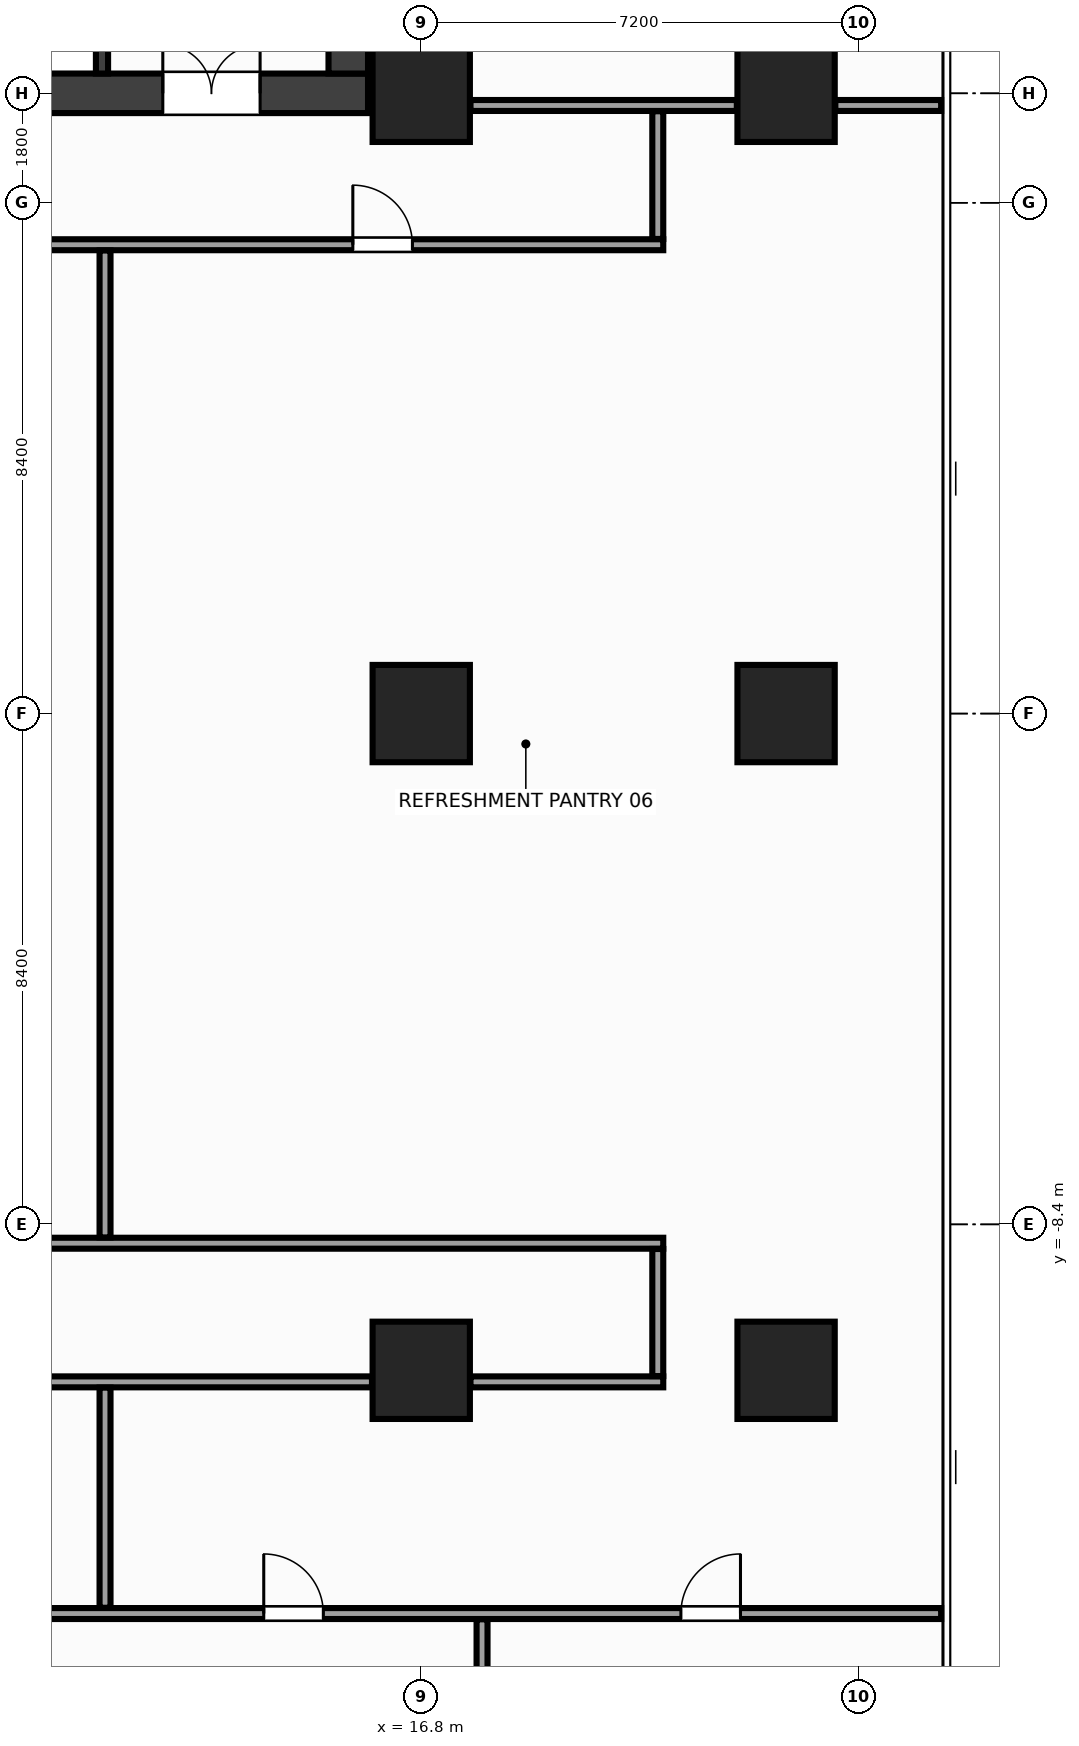
"""IFC4 building model, lengths in metres.
Left out: names, types, materials, properties, quantities, classifications, styles, units other than length and angle.
Written with IfcOpenShell. Run it as: python <this file> out.ifc"""

import sys

from ifc_helpers import new_model, si_unit, direction, frame, frame_2d, origin, origin_2d, place, context, subcontext, project, spatial, rectangle, extrude, source, transform, mapped, element, fill, save


model = new_model("IFC4")
c1 = context("Model", 3, precision=1e-05, world=origin(), true_north=direction((0.0, 1.0)))
c2 = subcontext(c1, "Body", "Model", "MODEL_VIEW")
j1 = project(units=[si_unit("LENGTHUNIT", "METRE"), si_unit("PLANEANGLEUNIT", "RADIAN")], contexts=[c1])
p1 = place(None, origin())
s1 = spatial("IfcSite", under=j1, at=p1, CompositionType="ELEMENT")
p2 = place(p1, origin())
s2 = spatial("IfcBuilding", under=s1, at=p2, CompositionType="ELEMENT")
p3 = place(p2, frame((0.0, 0.0, 120.8)))
s3 = spatial("IfcBuildingStorey", under=s2, at=p3, CompositionType="ELEMENT", Elevation=120.8)
m1 = source(origin(), c2, "Body", "SweptSolid", [
    extrude(rectangle(XDim=31.85, YDim=0.65, at=frame_2d((15.925, 0.0))), origin(), (0.0, 0.0, 1.0), 3.6),
])
p4 = place(p3, frame((-15.925, 10.2, 0.0), z_axis=(0.0, 0.0, 1.0), x_axis=(1.0, 0.0, 0.0)))
e1 = element("IfcWall", 1, at=p4, inside=s3, PredefinedType="SHEAR", context=c2, shape_type="MappedRepresentation", body=[
    mapped(m1, transform((0.0, 0.0, 0.0), x_axis=(1.0, 0.0, 0.0), y_axis=(0.0, 1.0, 0.0), z_axis=(0.0, 0.0, 1.0), scale=1.0)),
])
p5 = place(p4, frame((1.775, 0.0, 0.0)))
e2 = element("IfcOpeningElement", 2, at=p5, cuts=e1, PredefinedType="OPENING", context=c2, shape_type="SweptSolid", body=[
    extrude(rectangle(XDim=1.6, YDim=2.15, at=frame_2d((0.8, 1.075))), frame((0.0, 0.337, 0.0), z_axis=(0.0, -1.0, 0.0), x_axis=(1.0, 0.0, 0.0)), (0.0, 0.0, 1.0), 0.674),
])
p6 = place(p4, frame((28.475, 0.0, 0.0)))
e3 = element("IfcOpeningElement", 3, at=p6, cuts=e1, PredefinedType="OPENING", context=c2, shape_type="SweptSolid", body=[
    extrude(rectangle(XDim=1.6, YDim=2.15, at=frame_2d((0.8, 1.075))), frame((0.0, 0.337, 0.0), z_axis=(0.0, -1.0, 0.0), x_axis=(1.0, 0.0, 0.0)), (0.0, 0.0, 1.0), 0.674),
])
p7 = place(p4, frame((15.175, 0.0, 0.0)))
e4 = element("IfcOpeningElement", 4, at=p7, cuts=e1, PredefinedType="OPENING", context=c2, shape_type="SweptSolid", body=[
    extrude(rectangle(XDim=1.5, YDim=2.2, at=frame_2d((0.75, 1.1))), frame((0.0, 0.337, 0.0), z_axis=(0.0, -1.0, 0.0), x_axis=(1.0, 0.0, 0.0)), (0.0, 0.0, 1.0), 0.674),
])
m2 = source(origin(), c2, "Body", "SweptSolid", [
    extrude(rectangle(XDim=12.95, YDim=0.65, at=frame_2d((6.475, 0.0))), origin(), (0.0, 0.0, 1.0), 3.6),
])
p8 = place(p3, frame((15.6, 10.525, 0.0), z_axis=(0.0, 0.0, 1.0), x_axis=(0.0, 1.0, 0.0)))
e5 = element("IfcWall", 5, at=p8, inside=s3, PredefinedType="SHEAR", context=c2, shape_type="MappedRepresentation", body=[
    mapped(m2, transform((0.0, 0.0, 0.0), x_axis=(1.0, 0.0, 0.0), y_axis=(0.0, 1.0, 0.0), z_axis=(0.0, 0.0, 1.0), scale=1.0)),
])
m3 = source(origin(), c2, "Body", "SweptSolid", [
    extrude(rectangle(XDim=3.125, YDim=0.2, at=frame_2d((1.562, 0.0))), origin(), (0.0, 0.0, 1.0), 3.6),
])
p9 = place(p3, frame((11.55, 10.525, 0.0), z_axis=(0.0, 0.0, 1.0), x_axis=(0.0, 1.0, 0.0)))
e6 = element("IfcWall", 6, at=p9, inside=s3, PredefinedType="SHEAR", context=c2, shape_type="MappedRepresentation", body=[
    mapped(m3, transform((0.0, 0.0, 0.0), x_axis=(1.0, 0.0, 0.0), y_axis=(0.0, 1.0, 0.0), z_axis=(0.0, 0.0, 1.0), scale=1.0)),
])
p10 = place(p9, frame((0.9, 0.0, 0.0)))
e7 = element("IfcOpeningElement", 7, at=p10, cuts=e6, PredefinedType="OPENING", context=c2, shape_type="SweptSolid", body=[
    extrude(rectangle(XDim=1.1, YDim=2.15, at=frame_2d((0.55, 1.075))), frame((0.0, 0.112, 0.0), z_axis=(0.0, -1.0, 0.0), x_axis=(1.0, 0.0, 0.0)), (0.0, 0.0, 1.0), 0.224),
])
m4 = source(origin(), c2, "Body", "SweptSolid", [
    extrude(rectangle(XDim=1.6, YDim=1.6, at=origin_2d()), origin(), (0.0, 0.0, 1.0), 3.6),
])
for number, where, z_axis, x_axis in (
    (8, (16.8, -10.8, 0.0), (0.0, 0.0, 1.0), (1.0, 0.0, 0.0)),
    (9, (16.8, 0.0, 0.0), (0.0, 0.0, 1.0), (1.0, 0.0, 0.0)),
    (10, (16.8, 10.2, 0.0), (0.0, 0.0, 1.0), (1.0, 0.0, 0.0)),
    (11, (22.8, -10.8, 0.0), (0.0, 0.0, 1.0), (1.0, 0.0, 0.0)),
    (12, (22.8, 0.0, 0.0), (0.0, 0.0, 1.0), (1.0, 0.0, 0.0)),
    (13, (22.8, 10.2, 0.0), (0.0, 0.0, 1.0), (1.0, 0.0, 0.0)),
):
    element("IfcColumn", number, at=place(p3, frame(where, z_axis=z_axis, x_axis=x_axis)), inside=s3, PredefinedType="COLUMN", context=c2, shape_type="MappedRepresentation", body=[
        mapped(m4, transform((0.0, 0.0, 0.0), x_axis=(1.0, 0.0, 0.0), y_axis=(0.0, 1.0, 0.0), z_axis=(0.0, 0.0, 1.0), scale=1.0)),
    ])
m5 = source(origin(), c2, "Body", "SweptSolid", [
    extrude(rectangle(XDim=4.38, YDim=0.18, at=frame_2d((2.19, 0.0))), origin(), (0.0, 0.0, 1.0), 2.685),
])
p11 = place(p3, frame((17.61, 10.0, 0.0), z_axis=(0.0, 0.0, 1.0), x_axis=(1.0, 0.0, 0.0)))
e14 = element("IfcWall", 14, at=p11, inside=s3, PredefinedType="PARTITIONING", context=c2, shape_type="MappedRepresentation", body=[
    mapped(m5, transform((0.0, 0.0, 0.0), x_axis=(1.0, 0.0, 0.0), y_axis=(0.0, 1.0, 0.0), z_axis=(0.0, 0.0, 1.0), scale=1.0)),
])
m6 = source(origin(), c2, "Body", "SweptSolid", [
    extrude(rectangle(XDim=1.74, YDim=0.18, at=frame_2d((0.87, 0.0))), origin(), (0.0, 0.0, 1.0), 3.3),
])
p12 = place(p3, frame((23.61, 10.0, 0.0), z_axis=(0.0, 0.0, 1.0), x_axis=(1.0, 0.0, 0.0)))
e15 = element("IfcWall", 15, at=p12, inside=s3, PredefinedType="PARTITIONING", context=c2, shape_type="MappedRepresentation", body=[
    mapped(m6, transform((0.0, 0.0, 0.0), x_axis=(1.0, 0.0, 0.0), y_axis=(0.0, 1.0, 0.0), z_axis=(0.0, 0.0, 1.0), scale=1.0)),
])
m7 = source(origin(), c2, "Body", "SweptSolid", [
    extrude(rectangle(XDim=22.3, YDim=0.18, at=frame_2d((11.15, 0.0))), origin(), (0.0, 0.0, 1.0), 2.685),
])
p13 = place(p3, frame((-1.52, 7.71, 0.0), z_axis=(0.0, 0.0, 1.0), x_axis=(1.0, 0.0, 0.0)))
e16 = element("IfcWall", 16, at=p13, inside=s3, PredefinedType="PARTITIONING", context=c2, shape_type="MappedRepresentation", body=[
    mapped(m7, transform((0.0, 0.0, 0.0), x_axis=(1.0, 0.0, 0.0), y_axis=(0.0, 1.0, 0.0), z_axis=(0.0, 0.0, 1.0), scale=1.0)),
])
p14 = place(p13, frame((0.685, 0.0, 0.0)))
e17 = element("IfcOpeningElement", 17, at=p14, cuts=e16, PredefinedType="OPENING", context=c2, shape_type="SweptSolid", body=[
    extrude(rectangle(XDim=0.98, YDim=2.15, at=frame_2d((0.49, 1.075))), frame((0.0, 0.102, 0.0), z_axis=(0.0, -1.0, 0.0), x_axis=(1.0, 0.0, 0.0)), (0.0, 0.0, 1.0), 0.204),
])
p15 = place(p13, frame((7.23, 0.0, 0.0)))
e18 = element("IfcOpeningElement", 18, at=p15, cuts=e16, PredefinedType="OPENING", context=c2, shape_type="SweptSolid", body=[
    extrude(rectangle(XDim=0.98, YDim=2.15, at=frame_2d((0.49, 1.075))), frame((0.0, 0.102, 0.0), z_axis=(0.0, -1.0, 0.0), x_axis=(1.0, 0.0, 0.0)), (0.0, 0.0, 1.0), 0.204),
])
p16 = place(p13, frame((17.195, 0.0, 0.0)))
e19 = element("IfcOpeningElement", 19, at=p16, cuts=e16, PredefinedType="OPENING", context=c2, shape_type="SweptSolid", body=[
    extrude(rectangle(XDim=0.98, YDim=2.15, at=frame_2d((0.49, 1.075))), frame((0.0, 0.102, 0.0), z_axis=(0.0, -1.0, 0.0), x_axis=(1.0, 0.0, 0.0)), (0.0, 0.0, 1.0), 0.204),
])
p17 = place(p3, frame((-1.52, -8.71, 0.0), z_axis=(0.0, 0.0, 1.0), x_axis=(1.0, 0.0, 0.0)))
e20 = element("IfcWall", 20, at=p17, inside=s3, PredefinedType="PARTITIONING", context=c2, shape_type="MappedRepresentation", body=[
    mapped(m7, transform((0.0, 0.0, 0.0), x_axis=(1.0, 0.0, 0.0), y_axis=(0.0, 1.0, 0.0), z_axis=(0.0, 0.0, 1.0), scale=1.0)),
])
m8 = source(origin(), c2, "Body", "SweptSolid", [
    extrude(rectangle(XDim=7.08, YDim=0.18, at=frame_2d((3.54, 0.0))), origin(), (0.0, 0.0, 1.0), 2.685),
])
p18 = place(p3, frame((8.91, -10.99, 0.0), z_axis=(0.0, 0.0, 1.0), x_axis=(1.0, 0.0, 0.0)))
e21 = element("IfcWall", 21, at=p18, inside=s3, PredefinedType="PARTITIONING", context=c2, shape_type="MappedRepresentation", body=[
    mapped(m8, transform((0.0, 0.0, 0.0), x_axis=(1.0, 0.0, 0.0), y_axis=(0.0, 1.0, 0.0), z_axis=(0.0, 0.0, 1.0), scale=1.0)),
])
m9 = source(origin(), c2, "Body", "SweptSolid", [
    extrude(rectangle(XDim=3.17, YDim=0.18, at=frame_2d((1.585, 0.0))), origin(), (0.0, 0.0, 1.0), 2.685),
])
p19 = place(p3, frame((17.61, -10.99, 0.0), z_axis=(0.0, 0.0, 1.0), x_axis=(1.0, 0.0, 0.0)))
e22 = element("IfcWall", 22, at=p19, inside=s3, PredefinedType="PARTITIONING", context=c2, shape_type="MappedRepresentation", body=[
    mapped(m9, transform((0.0, 0.0, 0.0), x_axis=(1.0, 0.0, 0.0), y_axis=(0.0, 1.0, 0.0), z_axis=(0.0, 0.0, 1.0), scale=1.0)),
])
m10 = source(origin(), c2, "Body", "SweptSolid", [
    extrude(rectangle(XDim=2.1, YDim=0.18, at=frame_2d((1.05, 0.0))), origin(), (0.0, 0.0, 1.0), 3.3),
])
p20 = place(p3, frame((20.69, 7.805, 0.0), z_axis=(0.0, 0.0, 1.0), x_axis=(0.0, 1.0, 0.0)))
e23 = element("IfcWall", 23, at=p20, inside=s3, PredefinedType="PARTITIONING", context=c2, shape_type="MappedRepresentation", body=[
    mapped(m10, transform((0.0, 0.0, 0.0), x_axis=(1.0, 0.0, 0.0), y_axis=(0.0, 1.0, 0.0), z_axis=(0.0, 0.0, 1.0), scale=1.0)),
])
m11 = source(origin(), c2, "Body", "SweptSolid", [
    extrude(rectangle(XDim=2.09, YDim=0.18, at=frame_2d((1.045, 0.0))), origin(), (0.0, 0.0, 1.0), 3.3),
])
p21 = place(p3, frame((20.69, -10.895, 0.0), z_axis=(0.0, 0.0, 1.0), x_axis=(0.0, 1.0, 0.0)))
e24 = element("IfcWall", 24, at=p21, inside=s3, PredefinedType="PARTITIONING", context=c2, shape_type="MappedRepresentation", body=[
    mapped(m11, transform((0.0, 0.0, 0.0), x_axis=(1.0, 0.0, 0.0), y_axis=(0.0, 1.0, 0.0), z_axis=(0.0, 0.0, 1.0), scale=1.0)),
])
m12 = source(origin(), c2, "Body", "SweptSolid", [
    extrude(rectangle(XDim=50.7, YDim=0.18, at=frame_2d((25.35, 0.0))), origin(), (0.0, 0.0, 1.0), 2.885),
])
p22 = place(p3, frame((-25.35, -14.8, 0.0), z_axis=(0.0, 0.0, 1.0), x_axis=(1.0, 0.0, 0.0)))
e25 = element("IfcWall", 25, at=p22, inside=s3, PredefinedType="PARTITIONING", context=c2, shape_type="MappedRepresentation", body=[
    mapped(m12, transform((0.0, 0.0, 0.0), x_axis=(1.0, 0.0, 0.0), y_axis=(0.0, 1.0, 0.0), z_axis=(0.0, 0.0, 1.0), scale=1.0)),
])
p23 = place(p22, frame((2.7, 0.0, 0.0)))
e26 = element("IfcOpeningElement", 26, at=p23, cuts=e25, PredefinedType="OPENING", context=c2, shape_type="SweptSolid", body=[
    extrude(rectangle(XDim=0.98, YDim=2.15, at=frame_2d((0.49, 1.075))), frame((0.0, 0.102, 0.0), z_axis=(0.0, -1.0, 0.0), x_axis=(1.0, 0.0, 0.0)), (0.0, 0.0, 1.0), 0.204),
])
p24 = place(p22, frame((46.42, 0.0, 0.0)))
e27 = element("IfcOpeningElement", 27, at=p24, cuts=e25, PredefinedType="OPENING", context=c2, shape_type="SweptSolid", body=[
    extrude(rectangle(XDim=0.98, YDim=2.15, at=frame_2d((0.49, 1.075))), frame((0.0, 0.102, 0.0), z_axis=(0.0, -1.0, 0.0), x_axis=(1.0, 0.0, 0.0)), (0.0, 0.0, 1.0), 0.204),
])
p25 = place(p22, frame((13.16, 0.0, 0.0)))
e28 = element("IfcOpeningElement", 28, at=p25, cuts=e25, PredefinedType="OPENING", context=c2, shape_type="SweptSolid", body=[
    extrude(rectangle(XDim=0.98, YDim=2.15, at=frame_2d((0.49, 1.075))), frame((0.0, 0.102, 0.0), z_axis=(0.0, -1.0, 0.0), x_axis=(1.0, 0.0, 0.0)), (0.0, 0.0, 1.0), 0.204),
])
p26 = place(p22, frame((22.16, 0.0, 0.0)))
e29 = element("IfcOpeningElement", 29, at=p26, cuts=e25, PredefinedType="OPENING", context=c2, shape_type="SweptSolid", body=[
    extrude(rectangle(XDim=0.98, YDim=2.15, at=frame_2d((0.49, 1.075))), frame((0.0, 0.102, 0.0), z_axis=(0.0, -1.0, 0.0), x_axis=(1.0, 0.0, 0.0)), (0.0, 0.0, 1.0), 0.204),
])
p27 = place(p22, frame((30.66, 0.0, 0.0)))
e30 = element("IfcOpeningElement", 30, at=p27, cuts=e25, PredefinedType="OPENING", context=c2, shape_type="SweptSolid", body=[
    extrude(rectangle(XDim=0.98, YDim=2.15, at=frame_2d((0.49, 1.075))), frame((0.0, 0.102, 0.0), z_axis=(0.0, -1.0, 0.0), x_axis=(1.0, 0.0, 0.0)), (0.0, 0.0, 1.0), 0.204),
])
p28 = place(p22, frame((8.96, 0.0, 0.0)))
e31 = element("IfcOpeningElement", 31, at=p28, cuts=e25, PredefinedType="OPENING", context=c2, shape_type="SweptSolid", body=[
    extrude(rectangle(XDim=0.98, YDim=2.15, at=frame_2d((0.49, 1.075))), frame((0.0, 0.102, 0.0), z_axis=(0.0, -1.0, 0.0), x_axis=(1.0, 0.0, 0.0)), (0.0, 0.0, 1.0), 0.204),
])
p29 = place(p22, frame((39.56, 0.0, 0.0)))
e32 = element("IfcOpeningElement", 32, at=p29, cuts=e25, PredefinedType="OPENING", context=c2, shape_type="SweptSolid", body=[
    extrude(rectangle(XDim=0.98, YDim=2.15, at=frame_2d((0.49, 1.075))), frame((0.0, 0.102, 0.0), z_axis=(0.0, -1.0, 0.0), x_axis=(1.0, 0.0, 0.0)), (0.0, 0.0, 1.0), 0.204),
])
m13 = source(origin(), c2, "Body", "SweptSolid", [
    extrude(rectangle(XDim=3.62, YDim=0.18, at=frame_2d((1.81, 0.0))), origin(), (0.0, 0.0, 1.0), 3.3),
])
p30 = place(p3, frame((11.6, -14.705, 0.0), z_axis=(0.0, 0.0, 1.0), x_axis=(0.0, 1.0, 0.0)))
e33 = element("IfcWall", 33, at=p30, inside=s3, PredefinedType="PARTITIONING", context=c2, shape_type="MappedRepresentation", body=[
    mapped(m13, transform((0.0, 0.0, 0.0), x_axis=(1.0, 0.0, 0.0), y_axis=(0.0, 1.0, 0.0), z_axis=(0.0, 0.0, 1.0), scale=1.0)),
])
m14 = source(origin(), c2, "Body", "SweptSolid", [
    extrude(rectangle(XDim=16.23, YDim=0.18, at=frame_2d((8.115, 0.0))), origin(), (0.0, 0.0, 1.0), 2.585),
])
p31 = place(p3, frame((11.6, -8.615, 0.0), z_axis=(0.0, 0.0, 1.0), x_axis=(0.0, 1.0, 0.0)))
e34 = element("IfcWall", 34, at=p31, inside=s3, PredefinedType="PARTITIONING", context=c2, shape_type="MappedRepresentation", body=[
    mapped(m14, transform((0.0, 0.0, 0.0), x_axis=(1.0, 0.0, 0.0), y_axis=(0.0, 1.0, 0.0), z_axis=(0.0, 0.0, 1.0), scale=1.0)),
])
m15 = source(origin(), c2, "Body", "SweptSolid", [
    extrude(rectangle(XDim=10.755, YDim=0.18, at=frame_2d((5.377, 0.0))), origin(), (0.0, 0.0, 1.0), 2.685),
])
p32 = place(p3, frame((17.8, -25.65, 0.0), z_axis=(0.0, 0.0, 1.0), x_axis=(0.0, 1.0, 0.0)))
e35 = element("IfcWall", 35, at=p32, inside=s3, PredefinedType="PARTITIONING", context=c2, shape_type="MappedRepresentation", body=[
    mapped(m15, transform((0.0, 0.0, 0.0), x_axis=(1.0, 0.0, 0.0), y_axis=(0.0, 1.0, 0.0), z_axis=(0.0, 0.0, 1.0), scale=1.0)),
])
m16 = source(origin(), c2, "Body", "SweptSolid", [
    extrude(rectangle(XDim=1.6, YDim=2.15, at=frame_2d((0.8, 1.075))), frame((0.0, 0.025, 0.0), z_axis=(0.0, -1.0, 0.0), x_axis=(1.0, 0.0, 0.0)), (0.0, 0.0, 1.0), 0.05),
])
p33 = place(p6, origin())
e36 = element("IfcDoor", 36, at=p33, inside=s3, OperationType="DOUBLE_DOOR_SINGLE_SWING", PredefinedType="DOOR", context=c2, shape_type="MappedRepresentation", body=[
    mapped(m16, transform((0.0, 0.0, 0.0), x_axis=(1.0, 0.0, 0.0), y_axis=(0.0, 1.0, 0.0), z_axis=(0.0, 0.0, 1.0), scale=1.0)),
])
fill(e3, e36)
m17 = source(origin(), c2, "Body", "SweptSolid", [
    extrude(rectangle(XDim=0.98, YDim=2.15, at=frame_2d((0.49, 1.075))), frame((0.0, 0.025, 0.0), z_axis=(0.0, -1.0, 0.0), x_axis=(1.0, 0.0, 0.0)), (0.0, 0.0, 1.0), 0.05),
])
p34 = place(p16, origin())
e37 = element("IfcDoor", 37, at=p34, inside=s3, OperationType="SINGLE_SWING_LEFT", PredefinedType="DOOR", context=c2, shape_type="MappedRepresentation", body=[
    mapped(m17, transform((0.0, 0.0, 0.0), x_axis=(1.0, 0.0, 0.0), y_axis=(0.0, 1.0, 0.0), z_axis=(0.0, 0.0, 1.0), scale=1.0)),
])
fill(e19, e37)
p35 = place(p24, origin())
e38 = element("IfcDoor", 38, at=p35, inside=s3, OperationType="SINGLE_SWING_RIGHT", PredefinedType="DOOR", context=c2, shape_type="MappedRepresentation", body=[
    mapped(m17, transform((0.0, 0.0, 0.0), x_axis=(1.0, 0.0, 0.0), y_axis=(0.0, 1.0, 0.0), z_axis=(0.0, 0.0, 1.0), scale=1.0)),
])
fill(e27, e38)
p36 = place(p29, origin())
e39 = element("IfcDoor", 39, at=p36, inside=s3, OperationType="SINGLE_SWING_LEFT", PredefinedType="DOOR", context=c2, shape_type="MappedRepresentation", body=[
    mapped(m17, transform((0.0, 0.0, 0.0), x_axis=(1.0, 0.0, 0.0), y_axis=(0.0, 1.0, 0.0), z_axis=(0.0, 0.0, 1.0), scale=1.0)),
])
fill(e32, e39)
save(model, sys.argv[1])
